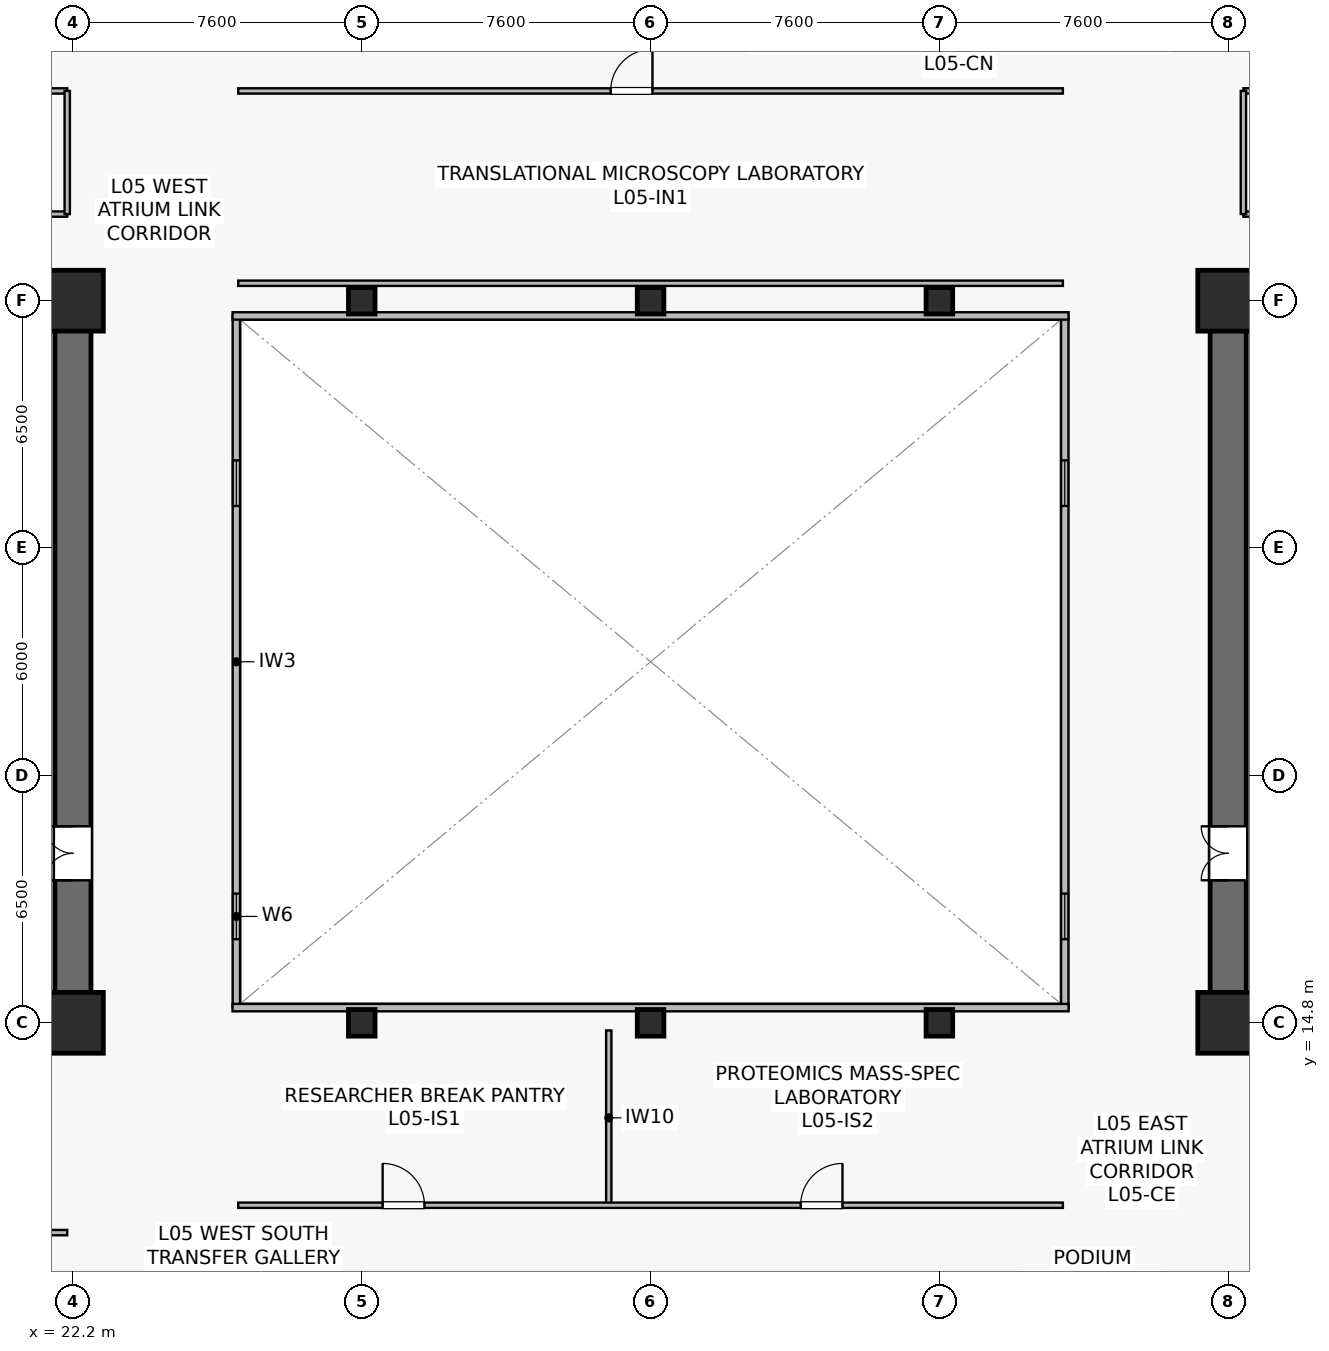
"""IFC4 building model, lengths in metres.
Left out: names, types, materials, properties, quantities, classifications, styles, units other than length and angle.
Written with IfcOpenShell. Run it as: python <this file> out.ifc"""

import sys

from ifc_helpers import new_model, si_unit, direction, frame, frame_2d, origin, origin_2d, place, context, subcontext, project, spatial, rectangle, hollow_rectangle, extrude, source, transform, mapped, element, fill, save


model = new_model("IFC4")
c1 = context("Model", 3, precision=1e-05, world=origin(), true_north=direction((0.0, 1.0)))
c2 = subcontext(c1, "Body", "Model", "MODEL_VIEW")
j1 = project(units=[si_unit("LENGTHUNIT", "METRE"), si_unit("PLANEANGLEUNIT", "RADIAN")], contexts=[c1])
p1 = place(None, origin())
s1 = spatial("IfcSite", under=j1, at=p1, CompositionType="ELEMENT")
p2 = place(p1, origin())
s2 = spatial("IfcBuilding", under=s1, at=p2, CompositionType="ELEMENT")
p3 = place(p2, frame((0.0, 0.0, 19.8)))
s3 = spatial("IfcBuildingStorey", under=s2, at=p3, CompositionType="ELEMENT", Elevation=19.8)
p4 = place(p3, frame((6.925, 14.8, 0.0), z_axis=(0.0, 0.0, 1.0), x_axis=(1.0, 0.0, 0.0)))
e1 = element("IfcWall", 1, at=p4, inside=s3, PredefinedType="SHEAR", context=c2, shape_type="SweptSolid", body=[
    extrude(rectangle(XDim=15.75, YDim=0.95, at=frame_2d((7.875, 0.0))), origin(), (0.0, 0.0, 1.0), 5.08),
])
p5 = place(p3, frame((6.925, 33.8, 0.0), z_axis=(0.0, 0.0, 1.0), x_axis=(1.0, 0.0, 0.0)))
e2 = element("IfcWall", 2, at=p5, inside=s3, PredefinedType="SHEAR", context=c2, shape_type="SweptSolid", body=[
    extrude(rectangle(XDim=15.75, YDim=0.95, at=frame_2d((7.875, 0.0))), origin(), (0.0, 0.0, 1.0), 5.08),
])
p6 = place(p5, frame((8.525, 0.0, 0.0)))
e3 = element("IfcOpeningElement", 3, at=p6, cuts=e2, PredefinedType="OPENING", context=c2, shape_type="SweptSolid", body=[
    extrude(rectangle(XDim=0.95, YDim=2.15, at=frame_2d((0.475, 1.075))), frame((0.0, 0.485, 0.0), z_axis=(0.0, -1.0, 0.0), x_axis=(1.0, 0.0, 0.0)), (0.0, 0.0, 1.0), 0.97),
])
p7 = place(p5, frame((12.065, 0.0, 0.0)))
e4 = element("IfcOpeningElement", 4, at=p7, cuts=e2, PredefinedType="OPENING", context=c2, shape_type="SweptSolid", body=[
    extrude(rectangle(XDim=0.95, YDim=2.15, at=frame_2d((0.475, 1.075))), frame((0.0, 0.485, 0.0), z_axis=(0.0, -1.0, 0.0), x_axis=(1.0, 0.0, 0.0)), (0.0, 0.0, 1.0), 0.97),
])
p8 = place(p3, frame((22.2, 15.275, 0.0), z_axis=(0.0, 0.0, 1.0), x_axis=(0.0, 1.0, 0.0)))
e5 = element("IfcWall", 5, at=p8, inside=s3, PredefinedType="SHEAR", context=c2, shape_type="SweptSolid", body=[
    extrude(rectangle(XDim=18.05, YDim=0.95, at=frame_2d((9.025, 0.0))), origin(), (0.0, 0.0, 1.0), 5.08),
])
p9 = place(p8, frame((3.275, 0.0, 0.0)))
e6 = element("IfcOpeningElement", 6, at=p9, cuts=e5, PredefinedType="OPENING", context=c2, shape_type="SweptSolid", body=[
    extrude(rectangle(XDim=1.42, YDim=2.2, at=frame_2d((0.71, 1.1))), frame((0.0, 0.485, 0.0), z_axis=(0.0, -1.0, 0.0), x_axis=(1.0, 0.0, 0.0)), (0.0, 0.0, 1.0), 0.97),
])
p10 = place(p3, frame((52.125, 14.8, 0.0), z_axis=(0.0, 0.0, 1.0), x_axis=(1.0, 0.0, 0.0)))
e7 = element("IfcWall", 7, at=p10, inside=s3, PredefinedType="SHEAR", context=c2, shape_type="SweptSolid", body=[
    extrude(rectangle(XDim=15.75, YDim=0.95, at=frame_2d((7.875, 0.0))), origin(), (0.0, 0.0, 1.0), 5.08),
])
p11 = place(p3, frame((52.125, 33.8, 0.0), z_axis=(0.0, 0.0, 1.0), x_axis=(1.0, 0.0, 0.0)))
e8 = element("IfcWall", 8, at=p11, inside=s3, PredefinedType="SHEAR", context=c2, shape_type="SweptSolid", body=[
    extrude(rectangle(XDim=15.75, YDim=0.95, at=frame_2d((7.875, 0.0))), origin(), (0.0, 0.0, 1.0), 5.08),
])
p12 = place(p11, frame((6.275, 0.0, 0.0)))
e9 = element("IfcOpeningElement", 9, at=p12, cuts=e8, PredefinedType="OPENING", context=c2, shape_type="SweptSolid", body=[
    extrude(rectangle(XDim=0.95, YDim=2.15, at=frame_2d((0.475, 1.075))), frame((0.0, 0.485, 0.0), z_axis=(0.0, -1.0, 0.0), x_axis=(1.0, 0.0, 0.0)), (0.0, 0.0, 1.0), 0.97),
])
p13 = place(p11, frame((2.735, 0.0, 0.0)))
e10 = element("IfcOpeningElement", 10, at=p13, cuts=e8, PredefinedType="OPENING", context=c2, shape_type="SweptSolid", body=[
    extrude(rectangle(XDim=0.95, YDim=2.15, at=frame_2d((0.475, 1.075))), frame((0.0, 0.485, 0.0), z_axis=(0.0, -1.0, 0.0), x_axis=(1.0, 0.0, 0.0)), (0.0, 0.0, 1.0), 0.97),
])
p14 = place(p3, frame((52.6, 15.275, 0.0), z_axis=(0.0, 0.0, 1.0), x_axis=(0.0, 1.0, 0.0)))
e11 = element("IfcWall", 11, at=p14, inside=s3, PredefinedType="SHEAR", context=c2, shape_type="SweptSolid", body=[
    extrude(rectangle(XDim=18.05, YDim=0.95, at=frame_2d((9.025, 0.0))), origin(), (0.0, 0.0, 1.0), 5.08),
])
p15 = place(p14, frame((3.275, 0.0, 0.0)))
e12 = element("IfcOpeningElement", 12, at=p15, cuts=e11, PredefinedType="OPENING", context=c2, shape_type="SweptSolid", body=[
    extrude(rectangle(XDim=1.42, YDim=2.2, at=frame_2d((0.71, 1.1))), frame((0.0, 0.485, 0.0), z_axis=(0.0, -1.0, 0.0), x_axis=(1.0, 0.0, 0.0)), (0.0, 0.0, 1.0), 0.97),
])
m1 = source(origin(), c2, "Body", "SweptSolid", [
    extrude(rectangle(XDim=1.6, YDim=1.6, at=origin_2d()), origin(), (0.0, 0.0, 1.0), 5.4),
])
for number, where, z_axis, x_axis in (
    (13, (22.2, 14.8, 0.0), (0.0, 0.0, 1.0), (1.0, 0.0, 0.0)),
    (14, (22.2, 33.8, 0.0), (0.0, 0.0, 1.0), (1.0, 0.0, 0.0)),
    (15, (52.6, 14.8, 0.0), (0.0, 0.0, 1.0), (1.0, 0.0, 0.0)),
    (16, (52.6, 33.8, 0.0), (0.0, 0.0, 1.0), (1.0, 0.0, 0.0)),
):
    element("IfcColumn", number, at=place(p3, frame(where, z_axis=z_axis, x_axis=x_axis)), inside=s3, PredefinedType="COLUMN", context=c2, shape_type="MappedRepresentation", body=[
        mapped(m1, transform((0.0, 0.0, 0.0), scale=1.0)),
    ])
m2 = source(origin(), c2, "Body", "SweptSolid", [
    extrude(hollow_rectangle(XDim=0.7, YDim=0.7, WallThickness=0.032, at=origin_2d()), origin(), (0.0, 0.0, 1.0), 5.4),
])
for number, where, z_axis, x_axis in (
    (17, (29.8, 14.8, 0.0), (0.0, 0.0, 1.0), (1.0, 0.0, 0.0)),
    (18, (29.8, 33.8, 0.0), (0.0, 0.0, 1.0), (1.0, 0.0, 0.0)),
    (19, (37.4, 14.8, 0.0), (0.0, 0.0, 1.0), (1.0, 0.0, 0.0)),
    (20, (37.4, 33.8, 0.0), (0.0, 0.0, 1.0), (1.0, 0.0, 0.0)),
    (21, (45.0, 14.8, 0.0), (0.0, 0.0, 1.0), (1.0, 0.0, 0.0)),
    (22, (45.0, 33.8, 0.0), (0.0, 0.0, 1.0), (1.0, 0.0, 0.0)),
):
    element("IfcColumn", number, at=place(p3, frame(where, z_axis=z_axis, x_axis=x_axis)), inside=s3, PredefinedType="COLUMN", context=c2, shape_type="MappedRepresentation", body=[
        mapped(m2, transform((0.0, 0.0, 0.0), scale=1.0)),
    ])
p16 = place(p3, frame((26.5, 15.2, 0.0), z_axis=(0.0, 0.0, 1.0), x_axis=(0.0, 1.0, 0.0)))
e23 = element("IfcWall", 23, at=p16, inside=s3, PredefinedType="SOLIDWALL", context=c2, shape_type="SweptSolid", body=[
    extrude(rectangle(XDim=18.2, YDim=0.195, at=frame_2d((9.1, 0.0))), origin(), (0.0, 0.0, 1.0), 5.08),
])
p17 = place(p16, frame((1.8, 0.0, 0.9)))
e24 = element("IfcOpeningElement", 24, at=p17, cuts=e23, PredefinedType="OPENING", context=c2, shape_type="SweptSolid", body=[
    extrude(rectangle(XDim=1.2, YDim=1.35, at=frame_2d((0.6, 0.675))), frame((0.0, 0.107, 0.0), z_axis=(0.0, -1.0, 0.0), x_axis=(1.0, 0.0, 0.0)), (0.0, 0.0, 1.0), 0.215),
])
p18 = place(p16, frame((13.2, 0.0, 0.9)))
e25 = element("IfcOpeningElement", 25, at=p18, cuts=e23, PredefinedType="OPENING", context=c2, shape_type="SweptSolid", body=[
    extrude(rectangle(XDim=1.2, YDim=1.35, at=frame_2d((0.6, 0.675))), frame((0.0, 0.107, 0.0), z_axis=(0.0, -1.0, 0.0), x_axis=(1.0, 0.0, 0.0)), (0.0, 0.0, 1.0), 0.215),
])
p19 = place(p3, frame((48.3, 15.2, 0.0), z_axis=(0.0, 0.0, 1.0), x_axis=(0.0, 1.0, 0.0)))
e26 = element("IfcWall", 26, at=p19, inside=s3, PredefinedType="SOLIDWALL", context=c2, shape_type="SweptSolid", body=[
    extrude(rectangle(XDim=18.2, YDim=0.195, at=frame_2d((9.1, 0.0))), origin(), (0.0, 0.0, 1.0), 5.08),
])
p20 = place(p19, frame((1.8, 0.0, 0.9)))
e27 = element("IfcOpeningElement", 27, at=p20, cuts=e26, PredefinedType="OPENING", context=c2, shape_type="SweptSolid", body=[
    extrude(rectangle(XDim=1.2, YDim=1.35, at=frame_2d((0.6, 0.675))), frame((0.0, 0.107, 0.0), z_axis=(0.0, -1.0, 0.0), x_axis=(1.0, 0.0, 0.0)), (0.0, 0.0, 1.0), 0.215),
])
p21 = place(p19, frame((13.2, 0.0, 0.9)))
e28 = element("IfcOpeningElement", 28, at=p21, cuts=e26, PredefinedType="OPENING", context=c2, shape_type="SweptSolid", body=[
    extrude(rectangle(XDim=1.2, YDim=1.35, at=frame_2d((0.6, 0.675))), frame((0.0, 0.107, 0.0), z_axis=(0.0, -1.0, 0.0), x_axis=(1.0, 0.0, 0.0)), (0.0, 0.0, 1.0), 0.215),
])
for number, where, z_axis, x_axis in (
    (29, (26.4, 15.2, 0.0), (0.0, 0.0, 1.0), (1.0, 0.0, 0.0)),
    (30, (26.4, 33.4, 0.0), (0.0, 0.0, 1.0), (1.0, 0.0, 0.0)),
):
    element("IfcWall", number, at=place(p3, frame(where, z_axis=z_axis, x_axis=x_axis)), inside=s3, PredefinedType="SOLIDWALL", context=c2, shape_type="SweptSolid", body=[
        extrude(rectangle(XDim=22.0, YDim=0.195, at=frame_2d((11.0, 0.0))), origin(), (0.0, 0.0, 1.0), 5.08),
    ])
p22 = place(p3, frame((36.3, 10.0, 0.0), z_axis=(0.0, 0.0, 1.0), x_axis=(0.0, 1.0, 0.0)))
e31 = element("IfcWall", 31, at=p22, inside=s3, PredefinedType="PARTITIONING", context=c2, shape_type="SweptSolid", body=[
    extrude(rectangle(XDim=4.6, YDim=0.14, at=frame_2d((2.3, 0.0))), origin(), (0.0, 0.0, 1.0), 4.165),
])
p23 = place(p3, frame((26.55, 10.0, 0.0), z_axis=(0.0, 0.0, 1.0), x_axis=(1.0, 0.0, 0.0)))
e32 = element("IfcWall", 32, at=p23, inside=s3, PredefinedType="PARTITIONING", context=c2, shape_type="SweptSolid", body=[
    extrude(rectangle(XDim=21.7, YDim=0.14, at=frame_2d((10.85, 0.0))), origin(), (0.0, 0.0, 1.0), 4.365),
])
p24 = place(p23, frame((3.8, 0.0, 0.0)))
e33 = element("IfcOpeningElement", 33, at=p24, cuts=e32, PredefinedType="OPENING", context=c2, shape_type="SweptSolid", body=[
    extrude(rectangle(XDim=1.1, YDim=2.18, at=frame_2d((0.55, 1.09))), frame((0.0, 0.08, 0.0), z_axis=(0.0, -1.0, 0.0), x_axis=(1.0, 0.0, 0.0)), (0.0, 0.0, 1.0), 0.16),
])
p25 = place(p23, frame((14.8, 0.0, 0.0)))
e34 = element("IfcOpeningElement", 34, at=p25, cuts=e32, PredefinedType="OPENING", context=c2, shape_type="SweptSolid", body=[
    extrude(rectangle(XDim=1.1, YDim=2.18, at=frame_2d((0.55, 1.09))), frame((0.0, 0.08, 0.0), z_axis=(0.0, -1.0, 0.0), x_axis=(1.0, 0.0, 0.0)), (0.0, 0.0, 1.0), 0.16),
])
p26 = place(p3, frame((7.6, 39.32, 0.0), z_axis=(0.0, 0.0, 1.0), x_axis=(1.0, 0.0, 0.0)))
e35 = element("IfcWall", 35, at=p26, inside=s3, PredefinedType="PARTITIONING", context=c2, shape_type="SweptSolid", body=[
    extrude(rectangle(XDim=14.45, YDim=0.14, at=frame_2d((7.225, 0.0))), origin(), (0.0, 0.0, 1.0), 4.365),
])
p27 = place(p26, frame((6.675, 0.0, 0.0)))
e36 = element("IfcOpeningElement", 36, at=p27, cuts=e35, PredefinedType="OPENING", context=c2, shape_type="SweptSolid", body=[
    extrude(rectangle(XDim=1.1, YDim=2.18, at=frame_2d((0.55, 1.09))), frame((0.0, 0.08, 0.0), z_axis=(0.0, -1.0, 0.0), x_axis=(1.0, 0.0, 0.0)), (0.0, 0.0, 1.0), 0.16),
])
p28 = place(p3, frame((7.6, 36.08, 0.0), z_axis=(0.0, 0.0, 1.0), x_axis=(1.0, 0.0, 0.0)))
e37 = element("IfcWall", 37, at=p28, inside=s3, PredefinedType="PARTITIONING", context=c2, shape_type="SweptSolid", body=[
    extrude(rectangle(XDim=14.45, YDim=0.14, at=frame_2d((7.225, 0.0))), origin(), (0.0, 0.0, 1.0), 4.365),
])
p29 = place(p3, frame((22.05, 36.08, 0.0), z_axis=(0.0, 0.0, 1.0), x_axis=(0.0, 1.0, 0.0)))
e38 = element("IfcWall", 38, at=p29, inside=s3, PredefinedType="PARTITIONING", context=c2, shape_type="SweptSolid", body=[
    extrude(rectangle(XDim=3.24, YDim=0.14, at=frame_2d((1.62, 0.0))), origin(), (0.0, 0.0, 1.0), 4.365),
])
p30 = place(p3, frame((53.0, 39.32, 0.0), z_axis=(0.0, 0.0, 1.0), x_axis=(1.0, 0.0, 0.0)))
e39 = element("IfcWall", 39, at=p30, inside=s3, PredefinedType="PARTITIONING", context=c2, shape_type="SweptSolid", body=[
    extrude(rectangle(XDim=14.2, YDim=0.14, at=frame_2d((7.1, 0.0))), origin(), (0.0, 0.0, 1.0), 4.365),
])
p31 = place(p30, frame((6.55, 0.0, 0.0)))
e40 = element("IfcOpeningElement", 40, at=p31, cuts=e39, PredefinedType="OPENING", context=c2, shape_type="SweptSolid", body=[
    extrude(rectangle(XDim=1.1, YDim=2.18, at=frame_2d((0.55, 1.09))), frame((0.0, 0.08, 0.0), z_axis=(0.0, -1.0, 0.0), x_axis=(1.0, 0.0, 0.0)), (0.0, 0.0, 1.0), 0.16),
])
p32 = place(p3, frame((53.0, 36.08, 0.0), z_axis=(0.0, 0.0, 1.0), x_axis=(1.0, 0.0, 0.0)))
e41 = element("IfcWall", 41, at=p32, inside=s3, PredefinedType="PARTITIONING", context=c2, shape_type="SweptSolid", body=[
    extrude(rectangle(XDim=14.2, YDim=0.14, at=frame_2d((7.1, 0.0))), origin(), (0.0, 0.0, 1.0), 4.365),
])
p33 = place(p3, frame((53.0, 36.08, 0.0), z_axis=(0.0, 0.0, 1.0), x_axis=(0.0, 1.0, 0.0)))
e42 = element("IfcWall", 42, at=p33, inside=s3, PredefinedType="PARTITIONING", context=c2, shape_type="SweptSolid", body=[
    extrude(rectangle(XDim=3.24, YDim=0.14, at=frame_2d((1.62, 0.0))), origin(), (0.0, 0.0, 1.0), 5.08),
])
p34 = place(p3, frame((7.6, 9.28, 0.0), z_axis=(0.0, 0.0, 1.0), x_axis=(1.0, 0.0, 0.0)))
e43 = element("IfcWall", 43, at=p34, inside=s3, PredefinedType="PARTITIONING", context=c2, shape_type="SweptSolid", body=[
    extrude(rectangle(XDim=14.45, YDim=0.14, at=frame_2d((7.225, 0.0))), origin(), (0.0, 0.0, 1.0), 4.365),
])
p35 = place(p34, frame((6.675, 0.0, 0.0)))
e44 = element("IfcOpeningElement", 44, at=p35, cuts=e43, PredefinedType="OPENING", context=c2, shape_type="SweptSolid", body=[
    extrude(rectangle(XDim=1.1, YDim=2.18, at=frame_2d((0.55, 1.09))), frame((0.0, 0.08, 0.0), z_axis=(0.0, -1.0, 0.0), x_axis=(1.0, 0.0, 0.0)), (0.0, 0.0, 1.0), 0.16),
])
p36 = place(p3, frame((26.55, 39.32, 0.0), z_axis=(0.0, 0.0, 1.0), x_axis=(1.0, 0.0, 0.0)))
e45 = element("IfcWall", 45, at=p36, inside=s3, PredefinedType="PARTITIONING", context=c2, shape_type="SweptSolid", body=[
    extrude(rectangle(XDim=21.7, YDim=0.14, at=frame_2d((10.85, 0.0))), origin(), (0.0, 0.0, 1.0), 4.365),
])
p37 = place(p36, frame((9.8, 0.0, 0.0)))
e46 = element("IfcOpeningElement", 46, at=p37, cuts=e45, PredefinedType="OPENING", context=c2, shape_type="SweptSolid", body=[
    extrude(rectangle(XDim=1.1, YDim=2.18, at=frame_2d((0.55, 1.09))), frame((0.0, 0.08, 0.0), z_axis=(0.0, -1.0, 0.0), x_axis=(1.0, 0.0, 0.0)), (0.0, 0.0, 1.0), 0.16),
])
p38 = place(p3, frame((26.55, 34.26, 0.0), z_axis=(0.0, 0.0, 1.0), x_axis=(1.0, 0.0, 0.0)))
e47 = element("IfcWall", 47, at=p38, inside=s3, PredefinedType="PARTITIONING", context=c2, shape_type="SweptSolid", body=[
    extrude(rectangle(XDim=21.7, YDim=0.14, at=frame_2d((10.85, 0.0))), origin(), (0.0, 0.0, 1.0), 4.365),
])
m3 = source(origin(), c2, "Body", "SweptSolid", [
    extrude(rectangle(XDim=1.2, YDim=1.35, at=frame_2d((0.6, 0.675))), frame((0.0, 0.03, 0.0), z_axis=(0.0, -1.0, 0.0), x_axis=(1.0, 0.0, 0.0)), (0.0, 0.0, 1.0), 0.06),
])
p39 = place(p17, origin())
e48 = element("IfcWindow", 48, at=p39, inside=s3, PartitioningType="SINGLE_PANEL", PredefinedType="WINDOW", context=c2, shape_type="MappedRepresentation", body=[
    mapped(m3, transform((0.0, 0.0, 0.0), scale=1.0)),
])
fill(e24, e48)
p40 = place(p18, origin())
e49 = element("IfcWindow", 49, at=p40, inside=s3, PartitioningType="SINGLE_PANEL", PredefinedType="WINDOW", context=c2, shape_type="MappedRepresentation", body=[
    mapped(m3, transform((0.0, 0.0, 0.0), scale=1.0)),
])
fill(e25, e49)
p41 = place(p20, origin())
e50 = element("IfcWindow", 50, at=p41, inside=s3, PartitioningType="SINGLE_PANEL", PredefinedType="WINDOW", context=c2, shape_type="MappedRepresentation", body=[
    mapped(m3, transform((0.0, 0.0, 0.0), scale=1.0)),
])
fill(e27, e50)
p42 = place(p21, origin())
e51 = element("IfcWindow", 51, at=p42, inside=s3, PartitioningType="SINGLE_PANEL", PredefinedType="WINDOW", context=c2, shape_type="MappedRepresentation", body=[
    mapped(m3, transform((0.0, 0.0, 0.0), scale=1.0)),
])
fill(e28, e51)
m4 = source(origin(), c2, "Body", "SweptSolid", [
    extrude(rectangle(XDim=1.42, YDim=2.2, at=frame_2d((0.71, 1.1))), frame((0.0, 0.025, 0.0), z_axis=(0.0, -1.0, 0.0), x_axis=(1.0, 0.0, 0.0)), (0.0, 0.0, 1.0), 0.05),
])
p43 = place(p9, origin())
e52 = element("IfcDoor", 52, at=p43, inside=s3, OperationType="DOUBLE_DOOR_SINGLE_SWING", PredefinedType="DOOR", context=c2, shape_type="MappedRepresentation", body=[
    mapped(m4, transform((0.0, 0.0, 0.0), scale=1.0)),
])
fill(e6, e52)
p44 = place(p15, origin())
e53 = element("IfcDoor", 53, at=p44, inside=s3, OperationType="DOUBLE_DOOR_SINGLE_SWING", PredefinedType="DOOR", context=c2, shape_type="MappedRepresentation", body=[
    mapped(m4, transform((0.0, 0.0, 0.0), scale=1.0)),
])
fill(e12, e53)
m5 = source(origin(), c2, "Body", "SweptSolid", [
    extrude(rectangle(XDim=1.1, YDim=2.18, at=frame_2d((0.55, 1.09))), frame((0.0, 0.025, 0.0), z_axis=(0.0, -1.0, 0.0), x_axis=(1.0, 0.0, 0.0)), (0.0, 0.0, 1.0), 0.05),
])
p45 = place(p24, origin())
e54 = element("IfcDoor", 54, at=p45, inside=s3, OperationType="SINGLE_SWING_LEFT", PredefinedType="DOOR", context=c2, shape_type="MappedRepresentation", body=[
    mapped(m5, transform((0.0, 0.0, 0.0), scale=1.0)),
])
fill(e33, e54)
p46 = place(p25, origin())
e55 = element("IfcDoor", 55, at=p46, inside=s3, OperationType="SINGLE_SWING_RIGHT", PredefinedType="DOOR", context=c2, shape_type="MappedRepresentation", body=[
    mapped(m5, transform((0.0, 0.0, 0.0), scale=1.0)),
])
fill(e34, e55)
p47 = place(p37, origin())
e56 = element("IfcDoor", 56, at=p47, inside=s3, OperationType="SINGLE_SWING_RIGHT", PredefinedType="DOOR", context=c2, shape_type="MappedRepresentation", body=[
    mapped(m5, transform((0.0, 0.0, 0.0), scale=1.0)),
])
fill(e46, e56)
save(model, sys.argv[1])
